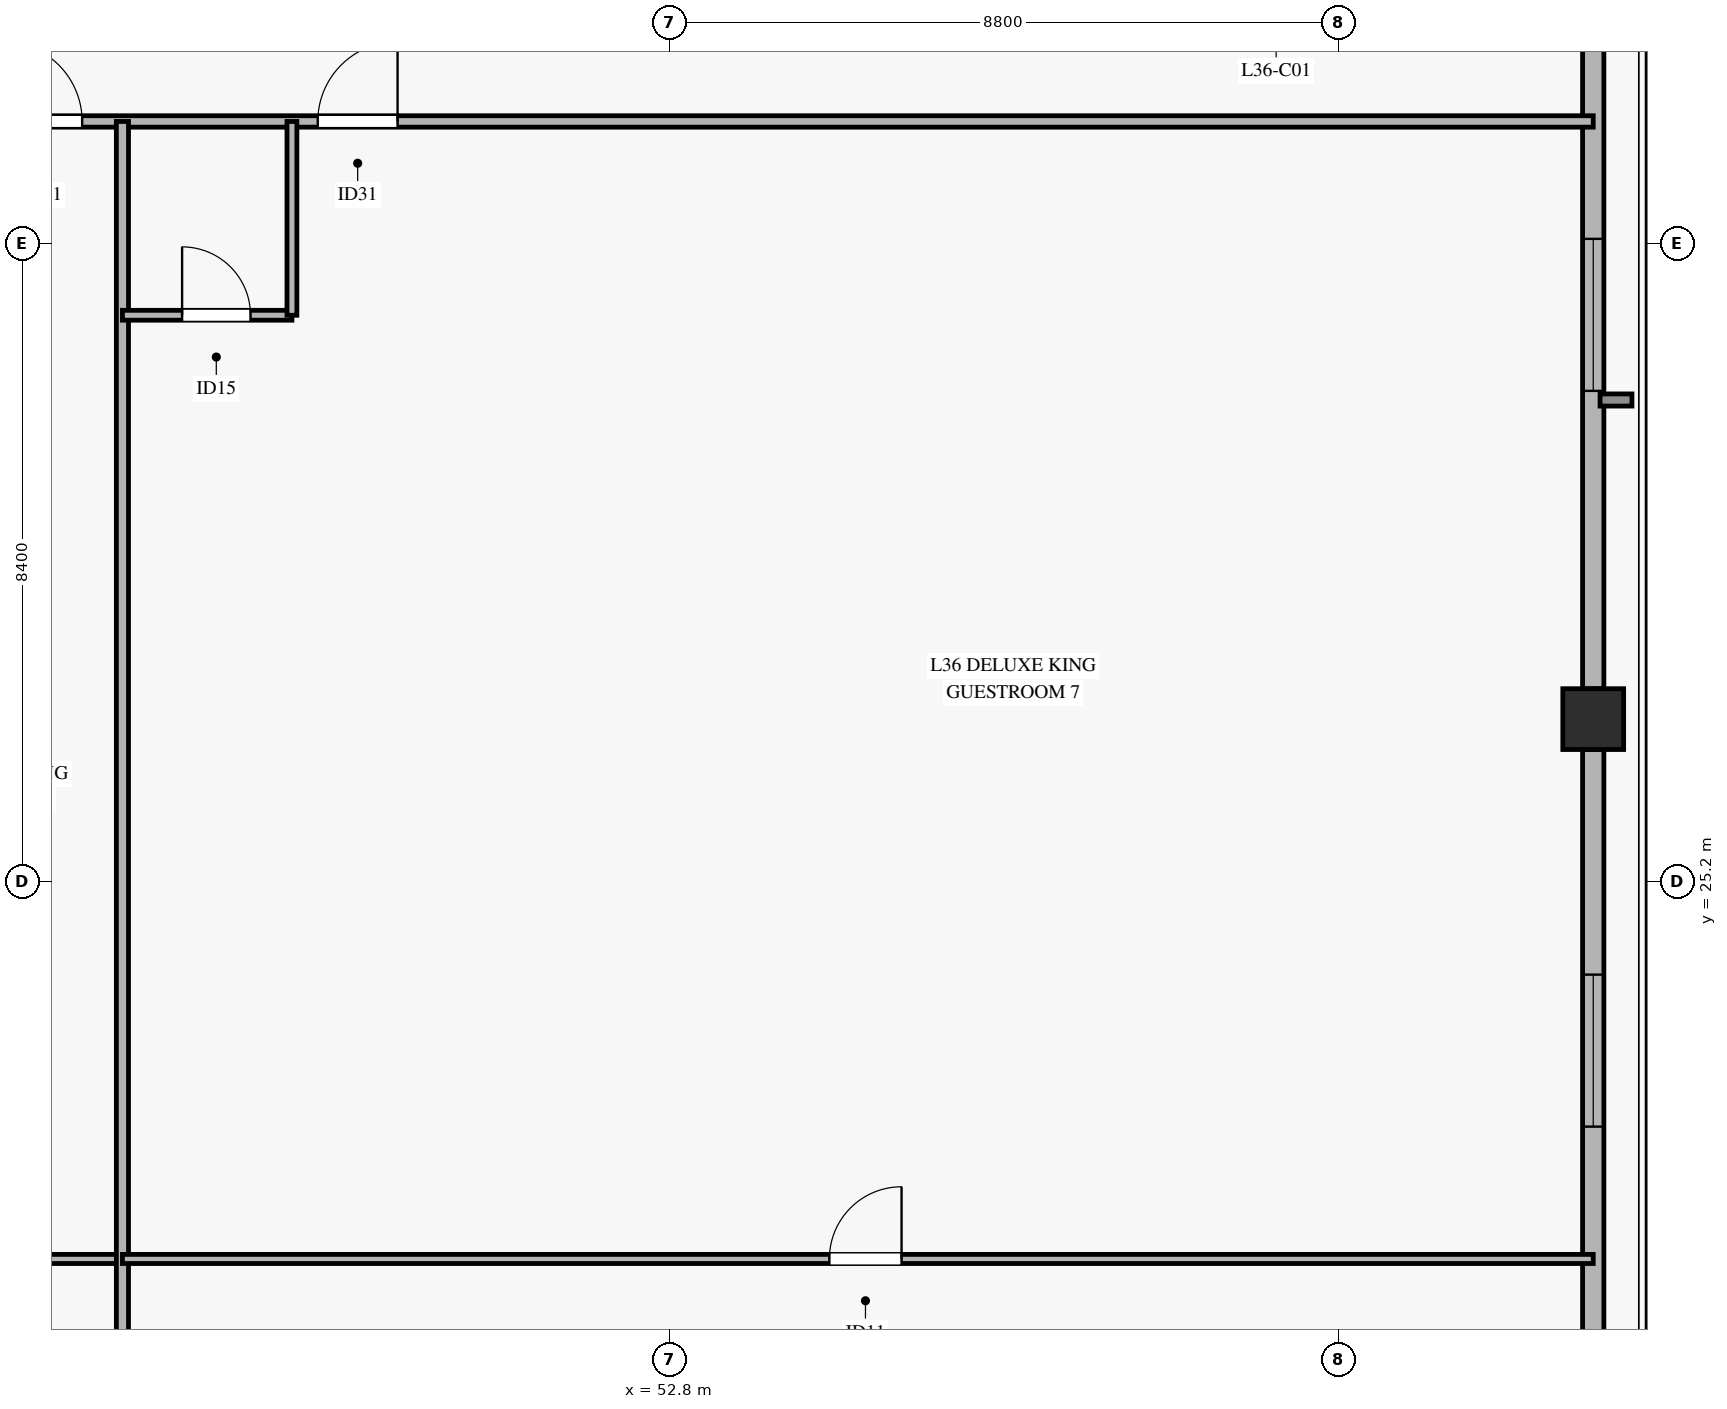
"""IFC4 building model, lengths in metres.
Left out: names, types, materials, properties, quantities, classifications, styles, units other than length and angle.
Written with IfcOpenShell. Run it as: python <this file> out.ifc"""

import sys

from ifc_helpers import new_model, si_unit, direction, frame, frame_2d, origin, origin_2d, place, context, subcontext, project, spatial, rectangle, hollow_rectangle, extrude, source, transform, mapped, element, fill, save


model = new_model("IFC4")
c1 = context("Model", 3, precision=1e-05, world=origin(), true_north=direction((0.0, 1.0)))
c2 = subcontext(c1, "Body", "Model", "MODEL_VIEW")
j1 = project(units=[si_unit("LENGTHUNIT", "METRE"), si_unit("PLANEANGLEUNIT", "RADIAN")], contexts=[c1])
p1 = place(None, origin())
s1 = spatial("IfcSite", under=j1, at=p1, CompositionType="ELEMENT")
p2 = place(p1, origin())
s2 = spatial("IfcBuilding", under=s1, at=p2, CompositionType="ELEMENT")
p3 = place(p2, frame((0.0, 0.0, 149.2)))
s3 = spatial("IfcBuildingStorey", under=s2, at=p3, CompositionType="ELEMENT", Elevation=149.2)
m1 = source(origin(), c2, "Body", "SweptSolid", [
    extrude(hollow_rectangle(XDim=0.8, YDim=0.8, WallThickness=0.036, at=origin_2d()), origin(), (0.0, 0.0, 1.0), 3.27),
])
p4 = place(p3, frame((64.951, 27.336, 0.0), z_axis=(0.0, 0.0, 1.0), x_axis=(1.0, 0.0, 0.0)))
e1 = element("IfcColumn", 1, at=p4, inside=s3, PredefinedType="COLUMN", context=c2, shape_type="MappedRepresentation", body=[
    mapped(m1, transform((0.0, 0.0, 0.0), x_axis=(1.0, 0.0, 0.0), y_axis=(0.0, 1.0, 0.0), z_axis=(0.0, 0.0, 1.0), scale=1.0)),
])
p5 = place(p3, frame((64.951, 11.511, 0.0), z_axis=(0.0, 0.0, 1.0), x_axis=(0.0, 1.0, 0.0)))
e2 = element("IfcWall", 2, at=p5, inside=s3, PredefinedType="SOLIDWALL", context=c2, shape_type="SweptSolid", body=[
    extrude(rectangle(XDim=15.425, YDim=0.28, at=frame_2d((7.712, 0.0))), origin(), (0.0, 0.0, 1.0), 2.75),
])
p6 = place(p5, frame((3.251, 0.0, 0.45)))
e3 = element("IfcOpeningElement", 3, at=p6, cuts=e2, PredefinedType="OPENING", context=c2, shape_type="SweptSolid", body=[
    extrude(rectangle(XDim=2.0, YDim=2.0, at=frame_2d((1.0, 1.0))), frame((0.0, 0.15, 0.0), z_axis=(0.0, -1.0, 0.0), x_axis=(1.0, 0.0, 0.0)), (0.0, 0.0, 1.0), 0.3),
])
p7 = place(p5, frame((10.463, 0.0, 0.45)))
e4 = element("IfcOpeningElement", 4, at=p7, cuts=e2, PredefinedType="OPENING", context=c2, shape_type="SweptSolid", body=[
    extrude(rectangle(XDim=2.0, YDim=2.0, at=frame_2d((1.0, 1.0))), frame((0.0, 0.15, 0.0), z_axis=(0.0, -1.0, 0.0), x_axis=(1.0, 0.0, 0.0)), (0.0, 0.0, 1.0), 0.3),
])
p8 = place(p3, frame((64.951, 27.736, 0.0), z_axis=(0.0, 0.0, 1.0), x_axis=(0.0, 1.0, 0.0)))
e5 = element("IfcWall", 5, at=p8, inside=s3, PredefinedType="SOLIDWALL", context=c2, shape_type="SweptSolid", body=[
    extrude(rectangle(XDim=15.425, YDim=0.28, at=frame_2d((7.712, 0.0))), origin(), (0.0, 0.0, 1.0), 2.75),
])
p9 = place(p8, frame((3.919, 0.0, 0.45)))
e6 = element("IfcOpeningElement", 6, at=p9, cuts=e5, PredefinedType="OPENING", context=c2, shape_type="SweptSolid", body=[
    extrude(rectangle(XDim=2.0, YDim=2.0, at=frame_2d((1.0, 1.0))), frame((0.0, 0.15, 0.0), z_axis=(0.0, -1.0, 0.0), x_axis=(1.0, 0.0, 0.0)), (0.0, 0.0, 1.0), 0.3),
])
p10 = place(p3, frame((5.449, 35.2, 0.0), z_axis=(0.0, 0.0, 1.0), x_axis=(1.0, 0.0, 0.0)))
e7 = element("IfcWall", 7, at=p10, inside=s3, PredefinedType="PARTITIONING", context=c2, shape_type="SweptSolid", body=[
    extrude(rectangle(XDim=59.502, YDim=0.15, at=frame_2d((29.751, 0.0))), origin(), (0.0, 0.0, 1.0), 2.455),
])
p11 = place(p10, frame((2.77, 0.0, 0.0)))
e8 = element("IfcOpeningElement", 8, at=p11, cuts=e7, PredefinedType="OPENING", context=c2, shape_type="SweptSolid", body=[
    extrude(rectangle(XDim=1.05, YDim=2.15, at=frame_2d((0.525, 1.075))), frame((0.0, 0.085, 0.0), z_axis=(0.0, -1.0, 0.0), x_axis=(1.0, 0.0, 0.0)), (0.0, 0.0, 1.0), 0.17),
])
p12 = place(p10, frame((18.921, 0.0, 0.0)))
e9 = element("IfcOpeningElement", 9, at=p12, cuts=e7, PredefinedType="OPENING", context=c2, shape_type="SweptSolid", body=[
    extrude(rectangle(XDim=1.05, YDim=2.15, at=frame_2d((0.525, 1.075))), frame((0.0, 0.085, 0.0), z_axis=(0.0, -1.0, 0.0), x_axis=(1.0, 0.0, 0.0)), (0.0, 0.0, 1.0), 0.17),
])
p13 = place(p10, frame((24.427, 0.0, 0.0)))
e10 = element("IfcOpeningElement", 10, at=p13, cuts=e7, PredefinedType="OPENING", context=c2, shape_type="SweptSolid", body=[
    extrude(rectangle(XDim=1.05, YDim=2.15, at=frame_2d((0.525, 1.075))), frame((0.0, 0.085, 0.0), z_axis=(0.0, -1.0, 0.0), x_axis=(1.0, 0.0, 0.0)), (0.0, 0.0, 1.0), 0.17),
])
p14 = place(p10, frame((29.227, 0.0, 0.0)))
e11 = element("IfcOpeningElement", 11, at=p14, cuts=e7, PredefinedType="OPENING", context=c2, shape_type="SweptSolid", body=[
    extrude(rectangle(XDim=1.05, YDim=2.15, at=frame_2d((0.525, 1.075))), frame((0.0, 0.085, 0.0), z_axis=(0.0, -1.0, 0.0), x_axis=(1.0, 0.0, 0.0)), (0.0, 0.0, 1.0), 0.17),
])
p15 = place(p10, frame((34.027, 0.0, 0.0)))
e12 = element("IfcOpeningElement", 12, at=p15, cuts=e7, PredefinedType="OPENING", context=c2, shape_type="SweptSolid", body=[
    extrude(rectangle(XDim=1.05, YDim=2.15, at=frame_2d((0.525, 1.075))), frame((0.0, 0.085, 0.0), z_axis=(0.0, -1.0, 0.0), x_axis=(1.0, 0.0, 0.0)), (0.0, 0.0, 1.0), 0.17),
])
p16 = place(p10, frame((38.571, 0.0, 0.0)))
e13 = element("IfcOpeningElement", 13, at=p16, cuts=e7, PredefinedType="OPENING", context=c2, shape_type="SweptSolid", body=[
    extrude(rectangle(XDim=1.05, YDim=2.15, at=frame_2d((0.525, 1.075))), frame((0.0, 0.085, 0.0), z_axis=(0.0, -1.0, 0.0), x_axis=(1.0, 0.0, 0.0)), (0.0, 0.0, 1.0), 0.17),
])
p17 = place(p10, frame((42.721, 0.0, 0.0)))
e14 = element("IfcOpeningElement", 14, at=p17, cuts=e7, PredefinedType="OPENING", context=c2, shape_type="SweptSolid", body=[
    extrude(rectangle(XDim=1.05, YDim=2.15, at=frame_2d((0.525, 1.075))), frame((0.0, 0.085, 0.0), z_axis=(0.0, -1.0, 0.0), x_axis=(1.0, 0.0, 0.0)), (0.0, 0.0, 1.0), 0.17),
])
p18 = place(p3, frame((42.0, 20.233, 0.0), z_axis=(0.0, 0.0, 1.0), x_axis=(1.0, 0.0, 0.0)))
e15 = element("IfcWall", 15, at=p18, inside=s3, PredefinedType="PARTITIONING", context=c2, shape_type="SweptSolid", body=[
    extrude(rectangle(XDim=3.6, YDim=0.12, at=frame_2d((1.8, 0.0))), origin(), (0.0, 0.0, 1.0), 2.455),
])
p19 = place(p18, frame((1.525, 0.0, 0.0)))
e16 = element("IfcOpeningElement", 16, at=p19, cuts=e15, PredefinedType="OPENING", context=c2, shape_type="SweptSolid", body=[
    extrude(rectangle(XDim=0.95, YDim=2.1, at=frame_2d((0.475, 1.05))), frame((0.0, 0.07, 0.0), z_axis=(0.0, -1.0, 0.0), x_axis=(1.0, 0.0, 0.0)), (0.0, 0.0, 1.0), 0.14),
])
p20 = place(p3, frame((45.6, 8.572, 0.0), z_axis=(0.0, 0.0, 1.0), x_axis=(0.0, 1.0, 0.0)))
e17 = element("IfcWall", 17, at=p20, inside=s3, PredefinedType="PARTITIONING", context=c2, shape_type="SweptSolid", body=[
    extrude(rectangle(XDim=26.628, YDim=0.16, at=frame_2d((13.314, 0.0))), origin(), (0.0, 0.0, 1.0), 2.755),
])
p21 = place(p3, frame((45.6, 32.65, 0.0), z_axis=(0.0, 0.0, 1.0), x_axis=(1.0, 0.0, 0.0)))
e18 = element("IfcWall", 18, at=p21, inside=s3, PredefinedType="PARTITIONING", context=c2, shape_type="SweptSolid", body=[
    extrude(rectangle(XDim=2.23, YDim=0.13, at=frame_2d((1.115, 0.0))), origin(), (0.0, 0.0, 1.0), 2.805),
])
p22 = place(p21, frame((0.785, 0.0, 0.0)))
e19 = element("IfcOpeningElement", 19, at=p22, cuts=e18, PredefinedType="OPENING", context=c2, shape_type="SweptSolid", body=[
    extrude(rectangle(XDim=0.9, YDim=2.1, at=frame_2d((0.45, 1.05))), frame((0.0, 0.075, 0.0), z_axis=(0.0, -1.0, 0.0), x_axis=(1.0, 0.0, 0.0)), (0.0, 0.0, 1.0), 0.15),
])
p23 = place(p3, frame((47.83, 32.65, 0.0), z_axis=(0.0, 0.0, 1.0), x_axis=(0.0, 1.0, 0.0)))
e20 = element("IfcWall", 20, at=p23, inside=s3, PredefinedType="PARTITIONING", context=c2, shape_type="SweptSolid", body=[
    extrude(rectangle(XDim=2.55, YDim=0.13, at=frame_2d((1.275, 0.0))), origin(), (0.0, 0.0, 1.0), 2.805),
])
p24 = place(p3, frame((45.6, 20.233, 0.0), z_axis=(0.0, 0.0, 1.0), x_axis=(1.0, 0.0, 0.0)))
e21 = element("IfcWall", 21, at=p24, inside=s3, PredefinedType="PARTITIONING", context=c2, shape_type="SweptSolid", body=[
    extrude(rectangle(XDim=19.351, YDim=0.12, at=frame_2d((9.675, 0.0))), origin(), (0.0, 0.0, 1.0), 2.455),
])
p25 = place(p24, frame((9.301, 0.0, 0.0)))
e22 = element("IfcOpeningElement", 22, at=p25, cuts=e21, PredefinedType="OPENING", context=c2, shape_type="SweptSolid", body=[
    extrude(rectangle(XDim=0.95, YDim=2.1, at=frame_2d((0.475, 1.05))), frame((0.0, 0.07, 0.0), z_axis=(0.0, -1.0, 0.0), x_axis=(1.0, 0.0, 0.0)), (0.0, 0.0, 1.0), 0.14),
])
m2 = source(origin(), c2, "Body", "SweptSolid", [
    extrude(rectangle(XDim=2.0, YDim=2.0, at=frame_2d((1.0, 1.0))), frame((0.0, 0.03, 0.0), z_axis=(0.0, -1.0, 0.0), x_axis=(1.0, 0.0, 0.0)), (0.0, 0.0, 1.0), 0.06),
])
p26 = place(p7, origin())
e23 = element("IfcWindow", 23, at=p26, inside=s3, PartitioningType="SINGLE_PANEL", PredefinedType="WINDOW", context=c2, shape_type="MappedRepresentation", body=[
    mapped(m2, transform((0.0, 0.0, 0.0), x_axis=(1.0, 0.0, 0.0), y_axis=(0.0, 1.0, 0.0), z_axis=(0.0, 0.0, 1.0), scale=1.0)),
])
fill(e4, e23)
p27 = place(p9, origin())
e24 = element("IfcWindow", 24, at=p27, inside=s3, PartitioningType="SINGLE_PANEL", PredefinedType="WINDOW", context=c2, shape_type="MappedRepresentation", body=[
    mapped(m2, transform((0.0, 0.0, 0.0), x_axis=(1.0, 0.0, 0.0), y_axis=(0.0, 1.0, 0.0), z_axis=(0.0, 0.0, 1.0), scale=1.0)),
])
fill(e6, e24)
m3 = source(origin(), c2, "Body", "SweptSolid", [
    extrude(rectangle(XDim=1.05, YDim=2.15, at=frame_2d((0.525, 1.075))), frame((0.0, 0.025, 0.0), z_axis=(0.0, -1.0, 0.0), x_axis=(1.0, 0.0, 0.0)), (0.0, 0.0, 1.0), 0.05),
])
p28 = place(p16, origin())
e25 = element("IfcDoor", 25, at=p28, inside=s3, OperationType="SINGLE_SWING_LEFT", PredefinedType="DOOR", context=c2, shape_type="MappedRepresentation", body=[
    mapped(m3, transform((0.0, 0.0, 0.0), x_axis=(1.0, 0.0, 0.0), y_axis=(0.0, 1.0, 0.0), z_axis=(0.0, 0.0, 1.0), scale=1.0)),
])
fill(e13, e25)
p29 = place(p17, origin())
e26 = element("IfcDoor", 26, at=p29, inside=s3, OperationType="SINGLE_SWING_RIGHT", PredefinedType="DOOR", context=c2, shape_type="MappedRepresentation", body=[
    mapped(m3, transform((0.0, 0.0, 0.0), x_axis=(1.0, 0.0, 0.0), y_axis=(0.0, 1.0, 0.0), z_axis=(0.0, 0.0, 1.0), scale=1.0)),
])
fill(e14, e26)
m4 = source(origin(), c2, "Body", "SweptSolid", [
    extrude(rectangle(XDim=0.9, YDim=2.1, at=frame_2d((0.45, 1.05))), frame((0.0, 0.025, 0.0), z_axis=(0.0, -1.0, 0.0), x_axis=(1.0, 0.0, 0.0)), (0.0, 0.0, 1.0), 0.05),
])
p30 = place(p22, origin())
e27 = element("IfcDoor", 27, at=p30, inside=s3, OperationType="SINGLE_SWING_LEFT", PredefinedType="DOOR", context=c2, shape_type="MappedRepresentation", body=[
    mapped(m4, transform((0.0, 0.0, 0.0), x_axis=(1.0, 0.0, 0.0), y_axis=(0.0, 1.0, 0.0), z_axis=(0.0, 0.0, 1.0), scale=1.0)),
])
fill(e19, e27)
m5 = source(origin(), c2, "Body", "SweptSolid", [
    extrude(rectangle(XDim=0.95, YDim=2.1, at=frame_2d((0.475, 1.05))), frame((0.0, 0.025, 0.0), z_axis=(0.0, -1.0, 0.0), x_axis=(1.0, 0.0, 0.0)), (0.0, 0.0, 1.0), 0.05),
])
p31 = place(p25, origin())
e28 = element("IfcDoor", 28, at=p31, inside=s3, OperationType="SINGLE_SWING_RIGHT", PredefinedType="DOOR", context=c2, shape_type="MappedRepresentation", body=[
    mapped(m5, transform((0.0, 0.0, 0.0), x_axis=(1.0, 0.0, 0.0), y_axis=(0.0, 1.0, 0.0), z_axis=(0.0, 0.0, 1.0), scale=1.0)),
])
fill(e22, e28)
save(model, sys.argv[1])
